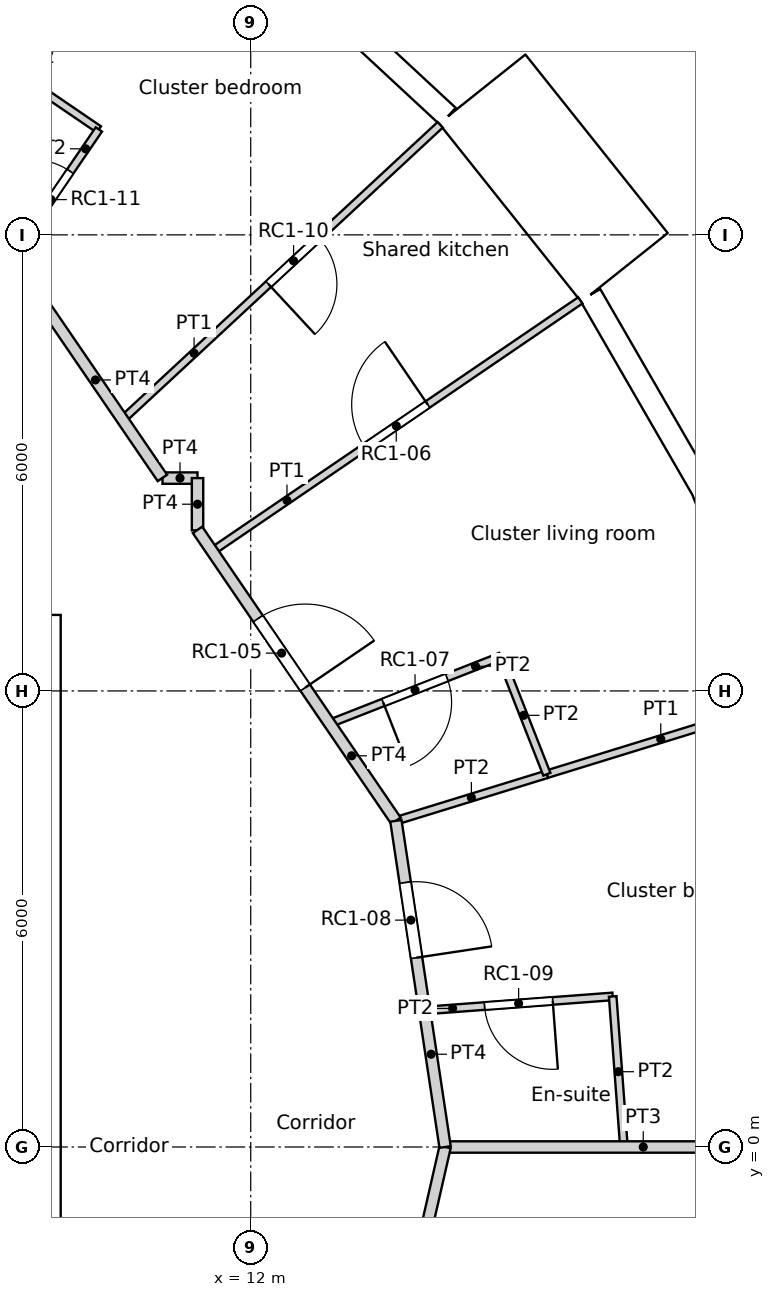
"""IFC4 building model, lengths in metres.
Left out: names, types, materials, properties, quantities, classifications, styles, units other than length and angle.
Written with IfcOpenShell. Run it as: python <this file> out.ifc"""

import sys

from ifc_helpers import new_model, si_unit, direction, frame, frame_2d, origin, origin_2d, place, context, subcontext, project, spatial, rectangle, circle, extrude, element, fill, save


model = new_model("IFC4")
c1 = context("Model", 3, precision=1e-05, world=origin(), true_north=direction((0.0, 1.0)))
c2 = subcontext(c1, "Body", "Model", "MODEL_VIEW")
j1 = project(units=[si_unit("LENGTHUNIT", "METRE"), si_unit("PLANEANGLEUNIT", "RADIAN")], contexts=[c1])
p1 = place(None, origin())
s1 = spatial("IfcSite", under=j1, at=p1, CompositionType="ELEMENT")
p2 = place(p1, origin())
s2 = spatial("IfcBuilding", under=s1, at=p2, CompositionType="ELEMENT")
p3 = place(p2, frame((0.0, 0.0, 231.0)))
s3 = spatial("IfcBuildingStorey", under=s2, at=p3, CompositionType="ELEMENT", Elevation=231.0)
for number, where, z_axis, x_axis in (
    (1, (17.986, 5.548, 0.0), (0.0, 0.0, 1.0), (1.0, 0.0, 0.0)),
    (2, (15.552, 10.603, 0.0), (0.0, 0.0, 1.0), (1.0, 0.0, 0.0)),
    (3, (11.735, 14.716, 0.0), (0.0, 0.0, 1.0), (1.0, 0.0, 0.0)),
):
    element("IfcColumn", number, at=place(p3, frame(where, z_axis=z_axis, x_axis=x_axis)), inside=s3, PredefinedType="COLUMN", context=c2, shape_type="SweptSolid", body=[
        extrude(circle(Radius=0.55, at=origin_2d()), origin(), (0.0, 0.0, 1.0), 3.6),
    ])
p4 = place(p3, frame((19.031, 5.886, 0.0), z_axis=(0.0, 0.0, 1.0), x_axis=(-0.365343821297, 0.930872650925, 0.0)))
e4 = element("IfcWall", 4, at=p4, inside=s3, PredefinedType="SOLIDWALL", context=c2, shape_type="SweptSolid", body=[
    extrude(rectangle(XDim=2.962, YDim=0.3, at=frame_2d((1.481, 0.0))), origin(), (0.0, 0.0, 1.0), 2.8),
])
p5 = place(p4, frame((1.481, 0.0, 1.55)))
e5 = element("IfcOpeningElement", 5, at=p5, cuts=e4, PredefinedType="OPENING", context=c2, shape_type="SweptSolid", body=[
    extrude(circle(Radius=0.9, at=origin_2d()), frame((0.0, 0.16, 0.0), z_axis=(0.0, -1.0, 0.0), x_axis=(1.0, 0.0, 0.0)), (0.0, 0.0, 1.0), 0.32),
])
p6 = place(p3, frame((17.949, 8.644, 0.0), z_axis=(0.0, 0.0, 1.0), x_axis=(-0.500012570604, 0.866018146021, 0.0)))
e6 = element("IfcWall", 6, at=p6, inside=s3, PredefinedType="SOLIDWALL", context=c2, shape_type="SweptSolid", body=[
    extrude(rectangle(XDim=2.962, YDim=0.3, at=frame_2d((1.481, 0.0))), origin(), (0.0, 0.0, 1.0), 3.25),
])
p7 = place(p6, frame((1.481, 0.0, 1.55)))
e7 = element("IfcOpeningElement", 7, at=p7, cuts=e6, PredefinedType="OPENING", context=c2, shape_type="SweptSolid", body=[
    extrude(circle(Radius=0.9, at=origin_2d()), frame((0.0, 0.16, 0.0), z_axis=(0.0, -1.0, 0.0), x_axis=(1.0, 0.0, 0.0)), (0.0, 0.0, 1.0), 0.32),
])
p8 = place(p3, frame((16.917, 11.572, -0.35), z_axis=(0.0, 0.0, 1.0), x_axis=(-0.623523286312, 0.781804778335, 0.0)))
e8 = element("IfcWall", 8, at=p8, inside=s3, PredefinedType="ELEMENTEDWALL", context=c2, shape_type="SweptSolid", body=[
    extrude(rectangle(XDim=3.0, YDim=1.45, at=frame_2d((1.5, 0.0))), origin(), (0.0, 0.0, 1.0), 3.6),
])
p9 = place(p8, frame((1.5, 0.0, 1.9)))
e9 = element("IfcOpeningElement", 9, at=p9, cuts=e8, PredefinedType="OPENING", context=c2, shape_type="SweptSolid", body=[
    extrude(circle(Radius=0.9, at=origin_2d()), frame((0.0, 0.735, 0.0), z_axis=(0.0, -1.0, 0.0), x_axis=(1.0, 0.0, 0.0)), (0.0, 0.0, 1.0), 1.47),
])
p10 = place(p3, frame((14.593, 13.561, 0.0), z_axis=(0.0, 0.0, 1.0), x_axis=(-0.733028283666, 0.680198158882, 0.0)))
e10 = element("IfcWall", 10, at=p10, inside=s3, PredefinedType="SOLIDWALL", context=c2, shape_type="SweptSolid", body=[
    extrude(rectangle(XDim=2.962, YDim=0.3, at=frame_2d((1.481, 0.0))), origin(), (0.0, 0.0, 1.0), 2.8),
])
p11 = place(p10, frame((1.481, 0.0, 1.55)))
e11 = element("IfcOpeningElement", 11, at=p11, cuts=e10, PredefinedType="OPENING", context=c2, shape_type="SweptSolid", body=[
    extrude(circle(Radius=0.9, at=origin_2d()), frame((0.0, 0.16, 0.0), z_axis=(0.0, -1.0, 0.0), x_axis=(1.0, 0.0, 0.0)), (0.0, 0.0, 1.0), 0.32),
])
p12 = place(p3, frame((-9.5, 6.7, 0.0), z_axis=(0.0, 0.0, 1.0), x_axis=(1.0, 0.0, 0.0)))
e12 = element("IfcWall", 12, at=p12, inside=s3, PredefinedType="SOLIDWALL", context=c2, shape_type="SweptSolid", body=[
    extrude(rectangle(XDim=19.0, YDim=0.6, at=frame_2d((9.5, 0.0))), origin(), (0.0, 0.0, 1.0), 3.6),
])
p13 = place(p12, frame((5.35, 0.0, 0.0)))
e13 = element("IfcOpeningElement", 13, at=p13, cuts=e12, PredefinedType="OPENING", context=c2, shape_type="SweptSolid", body=[
    extrude(rectangle(XDim=1.7, YDim=2.1, at=frame_2d((0.85, 1.05))), frame((0.0, 0.3, 0.0), z_axis=(0.0, -1.0, 0.0), x_axis=(1.0, 0.0, 0.0)), (0.0, 0.0, 1.0), 0.6),
])
p14 = place(p3, frame((9.2, -6.4, 0.0), z_axis=(0.0, 0.0, 1.0), x_axis=(0.0, 1.0, 0.0)))
e14 = element("IfcWall", 14, at=p14, inside=s3, PredefinedType="SOLIDWALL", context=c2, shape_type="SweptSolid", body=[
    extrude(rectangle(XDim=12.8, YDim=0.6, at=frame_2d((6.4, 0.0))), origin(), (0.0, 0.0, 1.0), 3.6),
])
p15 = place(p14, frame((6.4, 0.0, 0.0)))
e15 = element("IfcOpeningElement", 15, at=p15, cuts=e14, PredefinedType="OPENING", context=c2, shape_type="SweptSolid", body=[
    extrude(rectangle(XDim=1.8, YDim=2.1, at=frame_2d((0.9, 1.05))), frame((0.0, 0.3, 0.0), z_axis=(0.0, -1.0, 0.0), x_axis=(1.0, 0.0, 0.0)), (0.0, 0.0, 1.0), 0.6),
])
p16 = place(p3, frame((9.075, 11.381, 0.0), z_axis=(0.0, 0.0, 1.0), x_axis=(0.564277533473, -0.825585165333, 0.0)))
e16 = element("IfcWall", 16, at=p16, inside=s3, PredefinedType="PARTITIONING", context=c2, shape_type="SweptSolid", body=[
    extrude(rectangle(XDim=3.123, YDim=0.15, at=frame_2d((1.562, 0.0))), origin(), (0.0, 0.0, 1.0), 3.25),
])
p17 = place(p3, frame((10.839, 8.8, 0.0), z_axis=(0.0, 0.0, 1.0), x_axis=(1.0, 0.0, 0.0)))
e17 = element("IfcWall", 17, at=p17, inside=s3, PredefinedType="PARTITIONING", context=c2, shape_type="SweptSolid", body=[
    extrude(rectangle(XDim=0.461, YDim=0.15, at=frame_2d((0.23, 0.0))), origin(), (0.0, 0.0, 1.0), 3.25),
])
p18 = place(p3, frame((11.3, 8.113, 0.0), z_axis=(0.0, 0.0, 1.0), x_axis=(0.0, 1.0, 0.0)))
e18 = element("IfcWall", 18, at=p18, inside=s3, PredefinedType="PARTITIONING", context=c2, shape_type="SweptSolid", body=[
    extrude(rectangle(XDim=0.687, YDim=0.15, at=frame_2d((0.344, 0.0))), origin(), (0.0, 0.0, 1.0), 3.25),
])
p19 = place(p3, frame((11.3, 8.119, 0.0), z_axis=(0.0, 0.0, 1.0), x_axis=(0.56348561488, -0.82612587529, 0.0)))
e19 = element("IfcWall", 19, at=p19, inside=s3, PredefinedType="PARTITIONING", context=c2, shape_type="SweptSolid", body=[
    extrude(rectangle(XDim=4.633, YDim=0.15, at=frame_2d((2.316, 0.0))), origin(), (0.0, 0.0, 1.0), 3.25),
])
p20 = place(p19, frame((1.413, 0.0, 0.0)))
e20 = element("IfcOpeningElement", 20, at=p20, cuts=e19, PredefinedType="OPENING", context=c2, shape_type="SweptSolid", body=[
    extrude(rectangle(XDim=1.1, YDim=2.1, at=frame_2d((0.55, 1.05))), frame((0.0, 0.075, 0.0), z_axis=(0.0, -1.0, 0.0), x_axis=(1.0, 0.0, 0.0)), (0.0, 0.0, 1.0), 0.15),
])
p21 = place(p3, frame((13.91, 4.291, 0.0), z_axis=(0.0, 0.0, 1.0), x_axis=(0.149143716951, -0.988815529659, 0.0)))
e21 = element("IfcWall", 21, at=p21, inside=s3, PredefinedType="PARTITIONING", context=c2, shape_type="SweptSolid", body=[
    extrude(rectangle(XDim=4.34, YDim=0.15, at=frame_2d((2.17, 0.0))), origin(), (0.0, 0.0, 1.0), 3.25),
])
p22 = place(p21, frame((0.821, 0.0, 0.0)))
e22 = element("IfcOpeningElement", 22, at=p22, cuts=e21, PredefinedType="OPENING", context=c2, shape_type="SweptSolid", body=[
    extrude(rectangle(XDim=1.0, YDim=2.1, at=frame_2d((0.5, 1.05))), frame((0.0, 0.075, 0.0), z_axis=(0.0, -1.0, 0.0), x_axis=(1.0, 0.0, 0.0)), (0.0, 0.0, 1.0), 0.15),
])
p23 = place(p3, frame((13.115, -6.316, 0.0), z_axis=(0.0, 0.0, 1.0), x_axis=(0.222568978642, 0.97491694505, 0.0)))
e23 = element("IfcWall", 23, at=p23, inside=s3, PredefinedType="PARTITIONING", context=c2, shape_type="SweptSolid", body=[
    extrude(rectangle(XDim=6.479, YDim=0.15, at=frame_2d((3.239, 0.0))), origin(), (0.0, 0.0, 1.0), 3.25),
])
p24 = place(p23, frame((2.74, 0.0, 0.0)))
e24 = element("IfcOpeningElement", 24, at=p24, cuts=e23, PredefinedType="OPENING", context=c2, shape_type="SweptSolid", body=[
    extrude(rectangle(XDim=1.0, YDim=2.04, at=frame_2d((0.5, 1.02))), frame((0.0, 0.075, 0.0), z_axis=(0.0, -1.0, 0.0), x_axis=(1.0, 0.0, 0.0)), (0.0, 0.0, 1.0), 0.15),
])
p25 = place(p3, frame((11.493, 7.836, 0.0), z_axis=(0.0, 0.0, 1.0), x_axis=(0.826231748746, 0.563330362544, 0.0)))
e25 = element("IfcWall", 25, at=p25, inside=s3, PredefinedType="PARTITIONING", context=c2, shape_type="SweptSolid", body=[
    extrude(rectangle(XDim=5.862, YDim=0.1, at=frame_2d((2.931, 0.0))), origin(), (0.0, 0.0, 1.0), 3.25),
])
p26 = place(p25, frame((2.431, 0.0, 0.0)))
e26 = element("IfcOpeningElement", 26, at=p26, cuts=e25, PredefinedType="OPENING", context=c2, shape_type="SweptSolid", body=[
    extrude(rectangle(XDim=1.0, YDim=2.04, at=frame_2d((0.5, 1.02))), frame((0.0, 0.05, 0.0), z_axis=(0.0, -1.0, 0.0), x_axis=(1.0, 0.0, 0.0)), (0.0, 0.0, 1.0), 0.1),
])
p27 = place(p3, frame((15.287, 6.454, 0.0), z_axis=(0.0, 0.0, 1.0), x_axis=(0.365620622357, -0.930763966056, 0.0)))
e27 = element("IfcWall", 27, at=p27, inside=s3, PredefinedType="PARTITIONING", context=c2, shape_type="SweptSolid", body=[
    extrude(rectangle(XDim=1.665, YDim=0.1, at=frame_2d((0.833, 0.0))), origin(), (0.0, 0.0, 1.0), 3.25),
])
p28 = place(p3, frame((13.037, 5.571, 0.0), z_axis=(0.0, 0.0, 1.0), x_axis=(0.930874211086, 0.365339846083, 0.0)))
e28 = element("IfcWall", 28, at=p28, inside=s3, PredefinedType="PARTITIONING", context=c2, shape_type="SweptSolid", body=[
    extrude(rectangle(XDim=2.417, YDim=0.1, at=frame_2d((1.208, 0.0))), origin(), (0.0, 0.0, 1.0), 3.25),
])
p29 = place(p28, frame((0.758, 0.0, 0.0)))
e29 = element("IfcOpeningElement", 29, at=p29, cuts=e28, PredefinedType="OPENING", context=c2, shape_type="SweptSolid", body=[
    extrude(rectangle(XDim=0.9, YDim=2.0, at=frame_2d((0.45, 1.0))), frame((0.0, 0.05, 0.0), z_axis=(0.0, -1.0, 0.0), x_axis=(1.0, 0.0, 0.0)), (0.0, 0.0, 1.0), 0.1),
])
p30 = place(p3, frame((15.896, 4.904, 0.0), z_axis=(0.0, 0.0, 1.0), x_axis=(0.955630770746, 0.294567190983, 0.0)))
e30 = element("IfcWall", 30, at=p30, inside=s3, PredefinedType="PARTITIONING", context=c2, shape_type="SweptSolid", body=[
    extrude(rectangle(XDim=3.136, YDim=0.1, at=frame_2d((1.568, 0.0))), origin(), (0.0, 0.0, 1.0), 3.25),
])
p31 = place(p3, frame((10.312, 9.568, 0.0), z_axis=(0.0, 0.0, 1.0), x_axis=(0.733002312561, 0.680226146057, 0.0)))
e31 = element("IfcWall", 31, at=p31, inside=s3, PredefinedType="PARTITIONING", context=c2, shape_type="SweptSolid", body=[
    extrude(rectangle(XDim=5.704, YDim=0.1, at=frame_2d((2.852, 0.0))), origin(), (0.0, 0.0, 1.0), 3.25),
])
p32 = place(p31, frame((2.622, 0.0, 0.0)))
e32 = element("IfcOpeningElement", 32, at=p32, cuts=e31, PredefinedType="OPENING", context=c2, shape_type="SweptSolid", body=[
    extrude(rectangle(XDim=0.9, YDim=2.1, at=frame_2d((0.45, 1.05))), frame((0.0, 0.05, 0.0), z_axis=(0.0, -1.0, 0.0), x_axis=(1.0, 0.0, 0.0)), (0.0, 0.0, 1.0), 0.1),
])
p33 = place(p3, frame((13.91, 4.291, 0.0), z_axis=(0.0, 0.0, 1.0), x_axis=(0.955649377322, 0.294506821014, 0.0)))
e33 = element("IfcWall", 33, at=p33, inside=s3, PredefinedType="PARTITIONING", context=c2, shape_type="SweptSolid", body=[
    extrude(rectangle(XDim=2.078, YDim=0.1, at=frame_2d((1.039, 0.0))), origin(), (0.0, 0.0, 1.0), 3.25),
])
p34 = place(p3, frame((16.762, 1.981, 0.0), z_axis=(0.0, 0.0, 1.0), x_axis=(0.074478298815, -0.997222634624, 0.0)))
e34 = element("IfcWall", 34, at=p34, inside=s3, PredefinedType="PARTITIONING", context=c2, shape_type="SweptSolid", body=[
    extrude(rectangle(XDim=1.987, YDim=0.1, at=frame_2d((0.993, 0.0))), origin(), (0.0, 0.0, 1.0), 3.25),
])
p35 = place(p3, frame((14.286, 1.795, 0.0), z_axis=(0.0, 0.0, 1.0), x_axis=(0.997189401658, 0.074921940846, 0.0)))
e35 = element("IfcWall", 35, at=p35, inside=s3, PredefinedType="PARTITIONING", context=c2, shape_type="SweptSolid", body=[
    extrude(rectangle(XDim=2.483, YDim=0.1, at=frame_2d((1.242, 0.0))), origin(), (0.0, 0.0, 1.0), 3.25),
])
p36 = place(p35, frame((0.792, 0.0, 0.0)))
e36 = element("IfcOpeningElement", 36, at=p36, cuts=e35, PredefinedType="OPENING", context=c2, shape_type="SweptSolid", body=[
    extrude(rectangle(XDim=0.9, YDim=2.04, at=frame_2d((0.45, 1.02))), frame((0.0, 0.05, 0.0), z_axis=(0.0, -1.0, 0.0), x_axis=(1.0, 0.0, 0.0)), (0.0, 0.0, 1.0), 0.1),
])
p37 = place(p3, frame((14.557, 0.0, 0.0), z_axis=(0.0, 0.0, 1.0), x_axis=(1.0, 0.0, 0.0)))
e37 = element("IfcWall", 37, at=p37, inside=s3, PredefinedType="PARTITIONING", context=c2, shape_type="SweptSolid", body=[
    extrude(rectangle(XDim=5.214, YDim=0.15, at=frame_2d((2.607, 0.0))), origin(), (0.0, 0.0, 1.0), 3.25),
])
p38 = place(p3, frame((8.743, 11.541, 0.0), z_axis=(0.0, 0.0, 1.0), x_axis=(0.563469042551, 0.826137178734, 0.0)))
e38 = element("IfcWall", 38, at=p38, inside=s3, PredefinedType="PARTITIONING", context=c2, shape_type="SweptSolid", body=[
    extrude(rectangle(XDim=2.234, YDim=0.1, at=frame_2d((1.117, 0.0))), origin(), (0.0, 0.0, 1.0), 3.25),
])
p39 = place(p38, frame((0.667, 0.0, 0.0)))
e39 = element("IfcOpeningElement", 39, at=p39, cuts=e38, PredefinedType="OPENING", context=c2, shape_type="SweptSolid", body=[
    extrude(rectangle(XDim=0.9, YDim=2.04, at=frame_2d((0.45, 1.02))), frame((0.0, 0.05, 0.0), z_axis=(0.0, -1.0, 0.0), x_axis=(1.0, 0.0, 0.0)), (0.0, 0.0, 1.0), 0.1),
])
p40 = place(p3, frame((8.371, 14.499, 0.0), z_axis=(0.0, 0.0, 1.0), x_axis=(0.82620117489, -0.563375202339, 0.0)))
e40 = element("IfcWall", 40, at=p40, inside=s3, PredefinedType="PARTITIONING", context=c2, shape_type="SweptSolid", body=[
    extrude(rectangle(XDim=1.974, YDim=0.1, at=frame_2d((0.987, 0.0))), origin(), (0.0, 0.0, 1.0), 3.25),
])
p41 = place(p3, frame((7.115, 12.325, 0.0), z_axis=(0.0, 0.0, 1.0), x_axis=(0.500139547481, 0.865944821017, 0.0)))
e41 = element("IfcWall", 41, at=p41, inside=s3, PredefinedType="PARTITIONING", context=c2, shape_type="SweptSolid", body=[
    extrude(rectangle(XDim=5.54, YDim=0.15, at=frame_2d((2.77, 0.0))), origin(), (0.0, 0.0, 1.0), 3.25),
])
p42 = place(p7, origin())
e42 = element("IfcWindow", 42, at=p42, inside=s3, PartitioningType="SINGLE_PANEL", PredefinedType="WINDOW", context=c2, shape_type="SweptSolid", body=[
    extrude(circle(Radius=0.9, at=origin_2d()), frame((0.0, 0.12, 0.0), z_axis=(0.0, -1.0, 0.0), x_axis=(1.0, 0.0, 0.0)), (0.0, 0.0, 1.0), 0.1),
])
fill(e7, e42)
p43 = place(p9, origin())
e43 = element("IfcWindow", 43, at=p43, inside=s3, PartitioningType="SINGLE_PANEL", PredefinedType="WINDOW", context=c2, shape_type="SweptSolid", body=[
    extrude(circle(Radius=0.9, at=origin_2d()), frame((0.0, 0.695, 0.0), z_axis=(0.0, -1.0, 0.0), x_axis=(1.0, 0.0, 0.0)), (0.0, 0.0, 1.0), 0.1),
])
fill(e9, e43)
p44 = place(p11, origin())
e44 = element("IfcWindow", 44, at=p44, inside=s3, PartitioningType="SINGLE_PANEL", PredefinedType="WINDOW", context=c2, shape_type="SweptSolid", body=[
    extrude(circle(Radius=0.9, at=origin_2d()), frame((0.0, 0.12, 0.0), z_axis=(0.0, -1.0, 0.0), x_axis=(1.0, 0.0, 0.0)), (0.0, 0.0, 1.0), 0.1),
])
fill(e11, e44)
p45 = place(p20, origin())
e45 = element("IfcDoor", 45, at=p45, inside=s3, OperationType="SINGLE_SWING_RIGHT", PredefinedType="DOOR", context=c2, shape_type="SweptSolid", body=[
    extrude(rectangle(XDim=1.1, YDim=2.1, at=frame_2d((0.55, 1.05))), frame((0.0, 0.025, 0.0), z_axis=(0.0, -1.0, 0.0), x_axis=(1.0, 0.0, 0.0)), (0.0, 0.0, 1.0), 0.05),
])
fill(e20, e45)
p46 = place(p26, origin())
e46 = element("IfcDoor", 46, at=p46, inside=s3, OperationType="SINGLE_SWING_RIGHT", PredefinedType="DOOR", context=c2, shape_type="SweptSolid", body=[
    extrude(rectangle(XDim=1.0, YDim=2.04, at=frame_2d((0.5, 1.02))), frame((0.0, 0.025, 0.0), z_axis=(0.0, -1.0, 0.0), x_axis=(1.0, 0.0, 0.0)), (0.0, 0.0, 1.0), 0.05),
])
fill(e26, e46)
p47 = place(p29, origin())
e47 = element("IfcDoor", 47, at=p47, inside=s3, OperationType="SINGLE_SWING_RIGHT", PredefinedType="DOOR", context=c2, shape_type="SweptSolid", body=[
    extrude(rectangle(XDim=0.9, YDim=2.0, at=frame_2d((0.45, 1.0))), frame((0.0, 0.025, 0.0), z_axis=(0.0, -1.0, 0.0), x_axis=(1.0, 0.0, 0.0)), (0.0, 0.0, 1.0), 0.05),
])
fill(e29, e47)
p48 = place(p22, origin())
e48 = element("IfcDoor", 48, at=p48, inside=s3, OperationType="SINGLE_SWING_RIGHT", PredefinedType="DOOR", context=c2, shape_type="SweptSolid", body=[
    extrude(rectangle(XDim=1.0, YDim=2.1, at=frame_2d((0.5, 1.05))), frame((0.0, 0.025, 0.0), z_axis=(0.0, -1.0, 0.0), x_axis=(1.0, 0.0, 0.0)), (0.0, 0.0, 1.0), 0.05),
])
fill(e22, e48)
p49 = place(p36, origin())
e49 = element("IfcDoor", 49, at=p49, inside=s3, OperationType="SINGLE_SWING_LEFT", PredefinedType="DOOR", context=c2, shape_type="SweptSolid", body=[
    extrude(rectangle(XDim=0.9, YDim=2.04, at=frame_2d((0.45, 1.02))), frame((0.0, 0.025, 0.0), z_axis=(0.0, -1.0, 0.0), x_axis=(1.0, 0.0, 0.0)), (0.0, 0.0, 1.0), 0.05),
])
fill(e36, e49)
p50 = place(p32, origin())
e50 = element("IfcDoor", 50, at=p50, inside=s3, OperationType="SINGLE_SWING_RIGHT", PredefinedType="DOOR", context=c2, shape_type="SweptSolid", body=[
    extrude(rectangle(XDim=0.9, YDim=2.1, at=frame_2d((0.45, 1.05))), frame((0.0, 0.025, 0.0), z_axis=(0.0, -1.0, 0.0), x_axis=(1.0, 0.0, 0.0)), (0.0, 0.0, 1.0), 0.05),
])
fill(e32, e50)
p51 = place(p39, origin())
e51 = element("IfcDoor", 51, at=p51, inside=s3, OperationType="SINGLE_SWING_LEFT", PredefinedType="DOOR", context=c2, shape_type="SweptSolid", body=[
    extrude(rectangle(XDim=0.9, YDim=2.04, at=frame_2d((0.45, 1.02))), frame((0.0, 0.025, 0.0), z_axis=(0.0, -1.0, 0.0), x_axis=(1.0, 0.0, 0.0)), (0.0, 0.0, 1.0), 0.05),
])
fill(e39, e51)
save(model, sys.argv[1])
